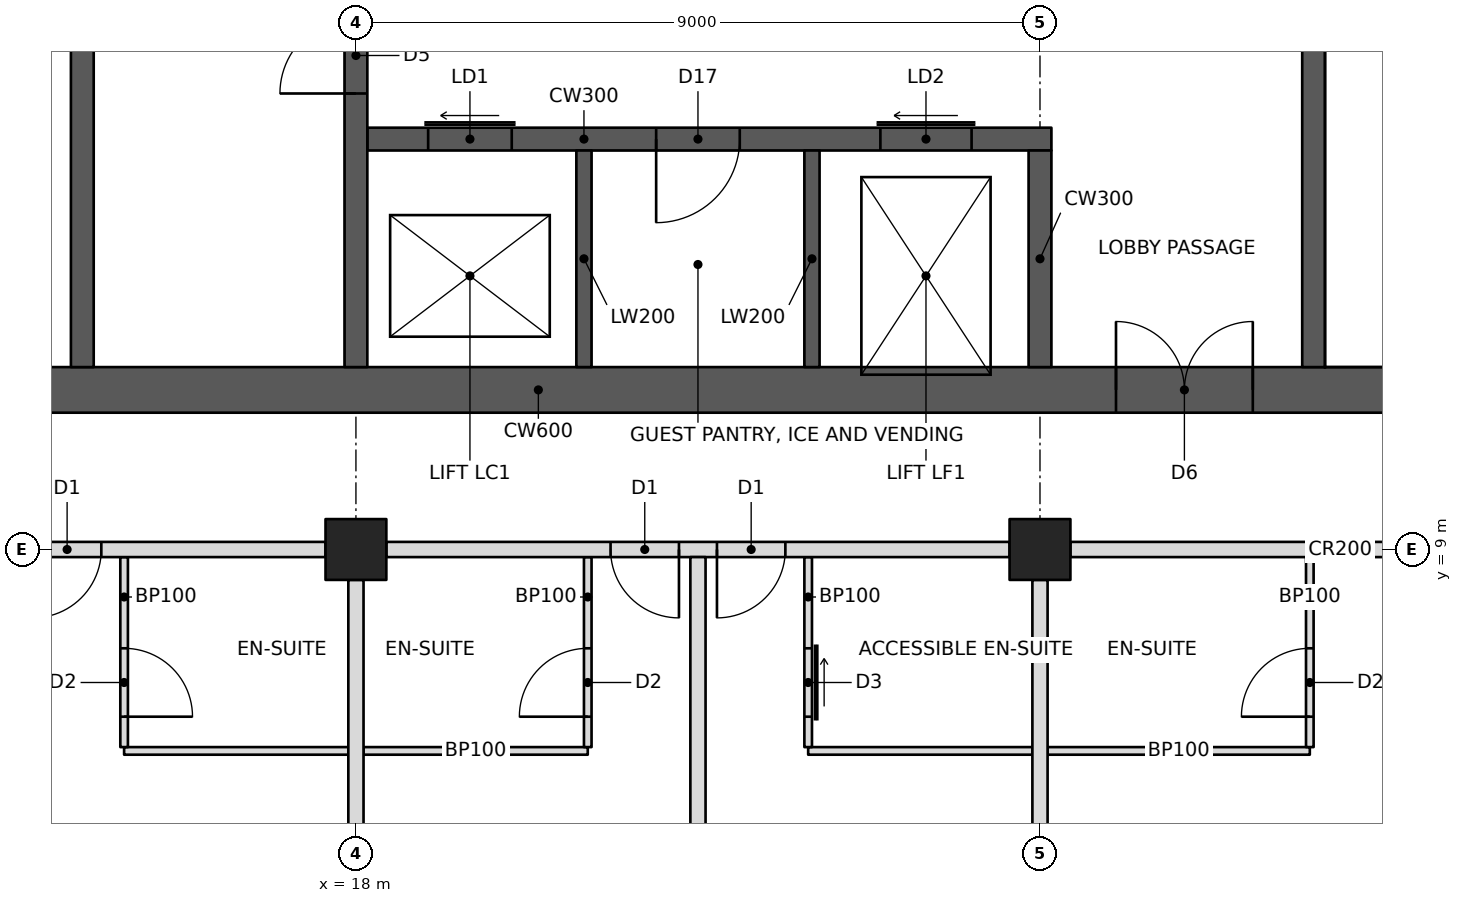
"""IFC4 building model, lengths in metres.
Left out: names, types, materials, properties, quantities, classifications, styles, units other than length and angle.
Written with IfcOpenShell. Run it as: python <this file> out.ifc"""

import sys

from ifc_helpers import new_model, si_unit, direction, frame, frame_2d, origin, origin_2d, place, context, subcontext, project, spatial, rectangle, hollow_rectangle, extrude, element, fill, save


model = new_model("IFC4")
c1 = context("Model", 3, precision=1e-05, world=origin(), true_north=direction((0.0, 1.0)))
c2 = subcontext(c1, "Body", "Model", "MODEL_VIEW")
j1 = project(units=[si_unit("LENGTHUNIT", "METRE"), si_unit("PLANEANGLEUNIT", "RADIAN")], contexts=[c1])
p1 = place(None, origin())
s1 = spatial("IfcSite", under=j1, at=p1, CompositionType="ELEMENT")
p2 = place(p1, origin())
s2 = spatial("IfcBuilding", under=s1, at=p2, CompositionType="ELEMENT")
p3 = place(p2, frame((0.0, 0.0, 255.4)))
s3 = spatial("IfcBuildingStorey", under=s2, at=p3, CompositionType="ELEMENT", Elevation=255.4)
for number, where, z_axis, x_axis in (
    (1, (18.0, 9.0, 0.0), (0.0, 0.0, 1.0), (1.0, 0.0, 0.0)),
    (2, (27.0, 9.0, 0.0), (0.0, 0.0, 1.0), (1.0, 0.0, 0.0)),
):
    element("IfcColumn", number, at=place(p3, frame(where, z_axis=z_axis, x_axis=x_axis)), inside=s3, PredefinedType="COLUMN", context=c2, shape_type="SweptSolid", body=[
        extrude(hollow_rectangle(XDim=0.8, YDim=0.8, WallThickness=0.032, at=origin_2d()), origin(), (0.0, 0.0, 1.0), 3.6),
    ])
p4 = place(p3, frame((10.8, 11.1, 0.0), z_axis=(0.0, 0.0, 1.0), x_axis=(1.0, 0.0, 0.0)))
e3 = element("IfcWall", 3, at=p4, inside=s3, PredefinedType="SHEAR", context=c2, shape_type="SweptSolid", body=[
    extrude(rectangle(XDim=23.4, YDim=0.6, at=frame_2d((11.7, 0.0))), origin(), (0.0, 0.0, 1.0), 3.6),
])
p5 = place(p4, frame((1.0, 0.0, 0.0)))
e4 = element("IfcOpeningElement", 4, at=p5, cuts=e3, PredefinedType="OPENING", context=c2, shape_type="SweptSolid", body=[
    extrude(rectangle(XDim=1.0, YDim=2.1, at=frame_2d((0.5, 1.05))), frame((0.0, 0.31, 0.0), z_axis=(0.0, -1.0, 0.0), x_axis=(1.0, 0.0, 0.0)), (0.0, 0.0, 1.0), 0.62),
])
p6 = place(p4, frame((17.2, 0.0, 0.0)))
e5 = element("IfcOpeningElement", 5, at=p6, cuts=e3, PredefinedType="OPENING", context=c2, shape_type="SweptSolid", body=[
    extrude(rectangle(XDim=1.8, YDim=2.1, at=frame_2d((0.9, 1.05))), frame((0.0, 0.31, 0.0), z_axis=(0.0, -1.0, 0.0), x_axis=(1.0, 0.0, 0.0)), (0.0, 0.0, 1.0), 0.62),
])
p7 = place(p3, frame((14.4, 11.4, 0.0), z_axis=(0.0, 0.0, 1.0), x_axis=(0.0, 1.0, 0.0)))
e6 = element("IfcWall", 6, at=p7, inside=s3, PredefinedType="SHEAR", context=c2, shape_type="SweptSolid", body=[
    extrude(rectangle(XDim=13.2, YDim=0.3, at=frame_2d((6.6, 0.0))), origin(), (0.0, 0.0, 1.0), 3.6),
])
p8 = place(p3, frame((18.0, 11.4, 0.0), z_axis=(0.0, 0.0, 1.0), x_axis=(0.0, 1.0, 0.0)))
e7 = element("IfcWall", 7, at=p8, inside=s3, PredefinedType="SHEAR", context=c2, shape_type="SweptSolid", body=[
    extrude(rectangle(XDim=13.2, YDim=0.3, at=frame_2d((6.6, 0.0))), origin(), (0.0, 0.0, 1.0), 3.6),
])
p9 = place(p8, frame((3.6, 0.0, 0.0)))
e8 = element("IfcOpeningElement", 8, at=p9, cuts=e7, PredefinedType="OPENING", context=c2, shape_type="SweptSolid", body=[
    extrude(rectangle(XDim=1.0, YDim=2.1, at=frame_2d((0.5, 1.05))), frame((0.0, 0.16, 0.0), z_axis=(0.0, -1.0, 0.0), x_axis=(1.0, 0.0, 0.0)), (0.0, 0.0, 1.0), 0.32),
])
p10 = place(p8, frame((7.85, 0.0, 0.0)))
e9 = element("IfcOpeningElement", 9, at=p10, cuts=e7, PredefinedType="OPENING", context=c2, shape_type="SweptSolid", body=[
    extrude(rectangle(XDim=1.1, YDim=2.1, at=frame_2d((0.55, 1.05))), frame((0.0, 0.16, 0.0), z_axis=(0.0, -1.0, 0.0), x_axis=(1.0, 0.0, 0.0)), (0.0, 0.0, 1.0), 0.32),
])
p11 = place(p3, frame((18.15, 14.4, 0.0), z_axis=(0.0, 0.0, 1.0), x_axis=(1.0, 0.0, 0.0)))
e10 = element("IfcWall", 10, at=p11, inside=s3, PredefinedType="SHEAR", context=c2, shape_type="SweptSolid", body=[
    extrude(rectangle(XDim=9.0, YDim=0.3, at=frame_2d((4.5, 0.0))), origin(), (0.0, 0.0, 1.0), 3.6),
])
p12 = place(p11, frame((0.8, 0.0, 0.0)))
e11 = element("IfcOpeningElement", 11, at=p12, cuts=e10, PredefinedType="OPENING", context=c2, shape_type="SweptSolid", body=[
    extrude(rectangle(XDim=1.1, YDim=2.1, at=frame_2d((0.55, 1.05))), frame((0.0, 0.16, 0.0), z_axis=(0.0, -1.0, 0.0), x_axis=(1.0, 0.0, 0.0)), (0.0, 0.0, 1.0), 0.32),
])
p13 = place(p11, frame((6.75, 0.0, 0.0)))
e12 = element("IfcOpeningElement", 12, at=p13, cuts=e10, PredefinedType="OPENING", context=c2, shape_type="SweptSolid", body=[
    extrude(rectangle(XDim=1.2, YDim=2.1, at=frame_2d((0.6, 1.05))), frame((0.0, 0.16, 0.0), z_axis=(0.0, -1.0, 0.0), x_axis=(1.0, 0.0, 0.0)), (0.0, 0.0, 1.0), 0.32),
])
p14 = place(p11, frame((3.8, 0.0, 0.0)))
e13 = element("IfcOpeningElement", 13, at=p14, cuts=e10, PredefinedType="OPENING", context=c2, shape_type="SweptSolid", body=[
    extrude(rectangle(XDim=1.1, YDim=2.1, at=frame_2d((0.55, 1.05))), frame((0.0, 0.16, 0.0), z_axis=(0.0, -1.0, 0.0), x_axis=(1.0, 0.0, 0.0)), (0.0, 0.0, 1.0), 0.32),
])
p15 = place(p3, frame((27.0, 11.4, 0.0), z_axis=(0.0, 0.0, 1.0), x_axis=(0.0, 1.0, 0.0)))
e14 = element("IfcWall", 14, at=p15, inside=s3, PredefinedType="SHEAR", context=c2, shape_type="SweptSolid", body=[
    extrude(rectangle(XDim=2.85, YDim=0.3, at=frame_2d((1.425, 0.0))), origin(), (0.0, 0.0, 1.0), 3.6),
])
for number, where, z_axis, x_axis in (
    (15, (21.0, 11.4, 0.0), (0.0, 0.0, 1.0), (0.0, 1.0, 0.0)),
    (16, (24.0, 11.4, 0.0), (0.0, 0.0, 1.0), (0.0, 1.0, 0.0)),
):
    element("IfcWall", number, at=place(p3, frame(where, z_axis=z_axis, x_axis=x_axis)), inside=s3, PredefinedType="SHEAR", context=c2, shape_type="SweptSolid", body=[
        extrude(rectangle(XDim=2.85, YDim=0.2, at=frame_2d((1.425, 0.0))), origin(), (0.0, 0.0, 1.0), 3.6),
    ])
p16 = place(p3, frame((30.6, 11.4, 0.0), z_axis=(0.0, 0.0, 1.0), x_axis=(0.0, 1.0, 0.0)))
e17 = element("IfcWall", 17, at=p16, inside=s3, PredefinedType="SHEAR", context=c2, shape_type="SweptSolid", body=[
    extrude(rectangle(XDim=13.2, YDim=0.3, at=frame_2d((6.6, 0.0))), origin(), (0.0, 0.0, 1.0), 3.6),
])
p17 = place(p3, frame((9.4, 9.0, 0.0), z_axis=(0.0, 0.0, 1.0), x_axis=(1.0, 0.0, 0.0)))
e18 = element("IfcWall", 18, at=p17, inside=s3, PredefinedType="PARTITIONING", context=c2, shape_type="SweptSolid", body=[
    extrude(rectangle(XDim=8.2, YDim=0.2, at=frame_2d((4.1, 0.0))), origin(), (0.0, 0.0, 1.0), 2.605),
])
p18 = place(p17, frame((2.95, 0.0, 0.0)))
e19 = element("IfcOpeningElement", 19, at=p18, cuts=e18, PredefinedType="OPENING", context=c2, shape_type="SweptSolid", body=[
    extrude(rectangle(XDim=0.9, YDim=2.1, at=frame_2d((0.45, 1.05))), frame((0.0, 0.11, 0.0), z_axis=(0.0, -1.0, 0.0), x_axis=(1.0, 0.0, 0.0)), (0.0, 0.0, 1.0), 0.22),
])
p19 = place(p17, frame((4.35, 0.0, 0.0)))
e20 = element("IfcOpeningElement", 20, at=p19, cuts=e18, PredefinedType="OPENING", context=c2, shape_type="SweptSolid", body=[
    extrude(rectangle(XDim=0.9, YDim=2.1, at=frame_2d((0.45, 1.05))), frame((0.0, 0.11, 0.0), z_axis=(0.0, -1.0, 0.0), x_axis=(1.0, 0.0, 0.0)), (0.0, 0.0, 1.0), 0.22),
])
p20 = place(p3, frame((18.4, 9.0, 0.0), z_axis=(0.0, 0.0, 1.0), x_axis=(1.0, 0.0, 0.0)))
e21 = element("IfcWall", 21, at=p20, inside=s3, PredefinedType="PARTITIONING", context=c2, shape_type="SweptSolid", body=[
    extrude(rectangle(XDim=8.2, YDim=0.2, at=frame_2d((4.1, 0.0))), origin(), (0.0, 0.0, 1.0), 2.605),
])
p21 = place(p20, frame((2.95, 0.0, 0.0)))
e22 = element("IfcOpeningElement", 22, at=p21, cuts=e21, PredefinedType="OPENING", context=c2, shape_type="SweptSolid", body=[
    extrude(rectangle(XDim=0.9, YDim=2.1, at=frame_2d((0.45, 1.05))), frame((0.0, 0.11, 0.0), z_axis=(0.0, -1.0, 0.0), x_axis=(1.0, 0.0, 0.0)), (0.0, 0.0, 1.0), 0.22),
])
p22 = place(p20, frame((4.35, 0.0, 0.0)))
e23 = element("IfcOpeningElement", 23, at=p22, cuts=e21, PredefinedType="OPENING", context=c2, shape_type="SweptSolid", body=[
    extrude(rectangle(XDim=0.9, YDim=2.1, at=frame_2d((0.45, 1.05))), frame((0.0, 0.11, 0.0), z_axis=(0.0, -1.0, 0.0), x_axis=(1.0, 0.0, 0.0)), (0.0, 0.0, 1.0), 0.22),
])
p23 = place(p3, frame((27.4, 9.0, 0.0), z_axis=(0.0, 0.0, 1.0), x_axis=(1.0, 0.0, 0.0)))
e24 = element("IfcWall", 24, at=p23, inside=s3, PredefinedType="PARTITIONING", context=c2, shape_type="SweptSolid", body=[
    extrude(rectangle(XDim=8.378, YDim=0.2, at=frame_2d((4.189, 0.0))), origin(), (0.0, 0.0, 1.0), 2.605),
])
p24 = place(p23, frame((7.25, 0.0, 0.0)))
e25 = element("IfcOpeningElement", 25, at=p24, cuts=e24, PredefinedType="OPENING", context=c2, shape_type="SweptSolid", body=[
    extrude(rectangle(XDim=0.9, YDim=2.1, at=frame_2d((0.45, 1.05))), frame((0.0, 0.11, 0.0), z_axis=(0.0, -1.0, 0.0), x_axis=(1.0, 0.0, 0.0)), (0.0, 0.0, 1.0), 0.22),
])
p25 = place(p3, frame((18.0, 8.6, 0.0), z_axis=(0.0, 0.0, 1.0), x_axis=(0.0, -1.0, 0.0)))
e26 = element("IfcWall", 26, at=p25, inside=s3, PredefinedType="PARTITIONING", context=c2, shape_type="SweptSolid", body=[
    extrude(rectangle(XDim=7.6, YDim=0.2, at=frame_2d((3.8, 0.0))), origin(), (0.0, 0.0, 1.0), 2.605),
])
p26 = place(p3, frame((22.5, 8.9, 0.0), z_axis=(0.0, 0.0, 1.0), x_axis=(0.0, -1.0, 0.0)))
e27 = element("IfcWall", 27, at=p26, inside=s3, PredefinedType="PARTITIONING", context=c2, shape_type="SweptSolid", body=[
    extrude(rectangle(XDim=7.9, YDim=0.2, at=frame_2d((3.95, 0.0))), origin(), (0.0, 0.0, 1.0), 2.604),
])
p27 = place(p3, frame((27.0, 8.6, 0.0), z_axis=(0.0, 0.0, 1.0), x_axis=(0.0, -1.0, 0.0)))
e28 = element("IfcWall", 28, at=p27, inside=s3, PredefinedType="PARTITIONING", context=c2, shape_type="SweptSolid", body=[
    extrude(rectangle(XDim=7.6, YDim=0.2, at=frame_2d((3.8, 0.0))), origin(), (0.0, 0.0, 1.0), 2.605),
])
p28 = place(p3, frame((14.95, 6.35, 0.0), z_axis=(0.0, 0.0, 1.0), x_axis=(1.0, 0.0, 0.0)))
e29 = element("IfcWall", 29, at=p28, inside=s3, PredefinedType="PARTITIONING", context=c2, shape_type="SweptSolid", body=[
    extrude(rectangle(XDim=2.95, YDim=0.1, at=frame_2d((1.475, 0.0))), origin(), (0.0, 0.0, 1.0), 2.604),
])
p29 = place(p3, frame((14.95, 8.9, 0.0), z_axis=(0.0, 0.0, 1.0), x_axis=(0.0, -1.0, 0.0)))
e30 = element("IfcWall", 30, at=p29, inside=s3, PredefinedType="PARTITIONING", context=c2, shape_type="SweptSolid", body=[
    extrude(rectangle(XDim=2.5, YDim=0.1, at=frame_2d((1.25, 0.0))), origin(), (0.0, 0.0, 1.0), 2.604),
])
p30 = place(p29, frame((1.2, 0.0, 0.0)))
e31 = element("IfcOpeningElement", 31, at=p30, cuts=e30, PredefinedType="OPENING", context=c2, shape_type="SweptSolid", body=[
    extrude(rectangle(XDim=0.9, YDim=2.1, at=frame_2d((0.45, 1.05))), frame((0.0, 0.06, 0.0), z_axis=(0.0, -1.0, 0.0), x_axis=(1.0, 0.0, 0.0)), (0.0, 0.0, 1.0), 0.12),
])
p31 = place(p3, frame((18.1, 6.35, 0.0), z_axis=(0.0, 0.0, 1.0), x_axis=(1.0, 0.0, 0.0)))
e32 = element("IfcWall", 32, at=p31, inside=s3, PredefinedType="PARTITIONING", context=c2, shape_type="SweptSolid", body=[
    extrude(rectangle(XDim=2.95, YDim=0.1, at=frame_2d((1.475, 0.0))), origin(), (0.0, 0.0, 1.0), 2.604),
])
p32 = place(p3, frame((21.05, 8.9, 0.0), z_axis=(0.0, 0.0, 1.0), x_axis=(0.0, -1.0, 0.0)))
e33 = element("IfcWall", 33, at=p32, inside=s3, PredefinedType="PARTITIONING", context=c2, shape_type="SweptSolid", body=[
    extrude(rectangle(XDim=2.5, YDim=0.1, at=frame_2d((1.25, 0.0))), origin(), (0.0, 0.0, 1.0), 2.604),
])
p33 = place(p32, frame((1.2, 0.0, 0.0)))
e34 = element("IfcOpeningElement", 34, at=p33, cuts=e33, PredefinedType="OPENING", context=c2, shape_type="SweptSolid", body=[
    extrude(rectangle(XDim=0.9, YDim=2.1, at=frame_2d((0.45, 1.05))), frame((0.0, 0.06, 0.0), z_axis=(0.0, -1.0, 0.0), x_axis=(1.0, 0.0, 0.0)), (0.0, 0.0, 1.0), 0.12),
])
p34 = place(p3, frame((23.95, 6.35, 0.0), z_axis=(0.0, 0.0, 1.0), x_axis=(1.0, 0.0, 0.0)))
e35 = element("IfcWall", 35, at=p34, inside=s3, PredefinedType="PARTITIONING", context=c2, shape_type="SweptSolid", body=[
    extrude(rectangle(XDim=2.95, YDim=0.1, at=frame_2d((1.475, 0.0))), origin(), (0.0, 0.0, 1.0), 2.604),
])
p35 = place(p3, frame((23.95, 8.9, 0.0), z_axis=(0.0, 0.0, 1.0), x_axis=(0.0, -1.0, 0.0)))
e36 = element("IfcWall", 36, at=p35, inside=s3, PredefinedType="PARTITIONING", context=c2, shape_type="SweptSolid", body=[
    extrude(rectangle(XDim=2.5, YDim=0.1, at=frame_2d((1.25, 0.0))), origin(), (0.0, 0.0, 1.0), 2.604),
])
p36 = place(p35, frame((1.2, 0.0, 0.0)))
e37 = element("IfcOpeningElement", 37, at=p36, cuts=e36, PredefinedType="OPENING", context=c2, shape_type="SweptSolid", body=[
    extrude(rectangle(XDim=0.9, YDim=2.1, at=frame_2d((0.45, 1.05))), frame((0.0, 0.06, 0.0), z_axis=(0.0, -1.0, 0.0), x_axis=(1.0, 0.0, 0.0)), (0.0, 0.0, 1.0), 0.12),
])
p37 = place(p3, frame((27.1, 6.35, 0.0), z_axis=(0.0, 0.0, 1.0), x_axis=(1.0, 0.0, 0.0)))
e38 = element("IfcWall", 38, at=p37, inside=s3, PredefinedType="PARTITIONING", context=c2, shape_type="SweptSolid", body=[
    extrude(rectangle(XDim=3.45, YDim=0.1, at=frame_2d((1.725, 0.0))), origin(), (0.0, 0.0, 1.0), 2.604),
])
p38 = place(p3, frame((30.55, 8.9, 0.0), z_axis=(0.0, 0.0, 1.0), x_axis=(0.0, -1.0, 0.0)))
e39 = element("IfcWall", 39, at=p38, inside=s3, PredefinedType="PARTITIONING", context=c2, shape_type="SweptSolid", body=[
    extrude(rectangle(XDim=2.5, YDim=0.1, at=frame_2d((1.25, 0.0))), origin(), (0.0, 0.0, 1.0), 2.604),
])
p39 = place(p38, frame((1.2, 0.0, 0.0)))
e40 = element("IfcOpeningElement", 40, at=p39, cuts=e39, PredefinedType="OPENING", context=c2, shape_type="SweptSolid", body=[
    extrude(rectangle(XDim=0.9, YDim=2.1, at=frame_2d((0.45, 1.05))), frame((0.0, 0.06, 0.0), z_axis=(0.0, -1.0, 0.0), x_axis=(1.0, 0.0, 0.0)), (0.0, 0.0, 1.0), 0.12),
])
p40 = place(p30, origin())
e41 = element("IfcDoor", 41, at=p40, inside=s3, OperationType="SINGLE_SWING_RIGHT", PredefinedType="DOOR", context=c2, shape_type="SweptSolid", body=[
    extrude(rectangle(XDim=0.9, YDim=2.1, at=frame_2d((0.45, 1.05))), frame((0.0, 0.025, 0.0), z_axis=(0.0, -1.0, 0.0), x_axis=(1.0, 0.0, 0.0)), (0.0, 0.0, 1.0), 0.05),
])
fill(e31, e41)
p41 = place(p19, frame((0.9, 0.0, 0.0), z_axis=(0.0, 0.0, 1.0), x_axis=(-1.0, 0.0, 0.0)))
e42 = element("IfcDoor", 42, at=p41, inside=s3, OperationType="SINGLE_SWING_RIGHT", PredefinedType="DOOR", context=c2, shape_type="SweptSolid", body=[
    extrude(rectangle(XDim=0.9, YDim=2.1, at=frame_2d((0.45, 1.05))), frame((0.0, 0.025, 0.0), z_axis=(0.0, -1.0, 0.0), x_axis=(1.0, 0.0, 0.0)), (0.0, 0.0, 1.0), 0.05),
])
fill(e20, e42)
p42 = place(p33, frame((0.9, 0.0, 0.0), z_axis=(0.0, 0.0, 1.0), x_axis=(-1.0, 0.0, 0.0)))
e43 = element("IfcDoor", 43, at=p42, inside=s3, OperationType="SINGLE_SWING_LEFT", PredefinedType="DOOR", context=c2, shape_type="SweptSolid", body=[
    extrude(rectangle(XDim=0.9, YDim=2.1, at=frame_2d((0.45, 1.05))), frame((0.0, 0.025, 0.0), z_axis=(0.0, -1.0, 0.0), x_axis=(1.0, 0.0, 0.0)), (0.0, 0.0, 1.0), 0.05),
])
fill(e34, e43)
p43 = place(p21, frame((0.9, 0.0, 0.0), z_axis=(0.0, 0.0, 1.0), x_axis=(-1.0, 0.0, 0.0)))
e44 = element("IfcDoor", 44, at=p43, inside=s3, OperationType="SINGLE_SWING_LEFT", PredefinedType="DOOR", context=c2, shape_type="SweptSolid", body=[
    extrude(rectangle(XDim=0.9, YDim=2.1, at=frame_2d((0.45, 1.05))), frame((0.0, 0.025, 0.0), z_axis=(0.0, -1.0, 0.0), x_axis=(1.0, 0.0, 0.0)), (0.0, 0.0, 1.0), 0.05),
])
fill(e22, e44)
p44 = place(p36, origin())
e45 = element("IfcDoor", 45, at=p44, inside=s3, OperationType="SLIDING_TO_LEFT", PredefinedType="DOOR", context=c2, shape_type="SweptSolid", body=[
    extrude(rectangle(XDim=0.9, YDim=2.1, at=frame_2d((0.45, 1.05))), frame((0.0, 0.025, 0.0), z_axis=(0.0, -1.0, 0.0), x_axis=(1.0, 0.0, 0.0)), (0.0, 0.0, 1.0), 0.05),
])
fill(e37, e45)
p45 = place(p22, frame((0.9, 0.0, 0.0), z_axis=(0.0, 0.0, 1.0), x_axis=(-1.0, 0.0, 0.0)))
e46 = element("IfcDoor", 46, at=p45, inside=s3, OperationType="SINGLE_SWING_RIGHT", PredefinedType="DOOR", context=c2, shape_type="SweptSolid", body=[
    extrude(rectangle(XDim=0.9, YDim=2.1, at=frame_2d((0.45, 1.05))), frame((0.0, 0.025, 0.0), z_axis=(0.0, -1.0, 0.0), x_axis=(1.0, 0.0, 0.0)), (0.0, 0.0, 1.0), 0.05),
])
fill(e23, e46)
p46 = place(p39, frame((0.9, 0.0, 0.0), z_axis=(0.0, 0.0, 1.0), x_axis=(-1.0, 0.0, 0.0)))
e47 = element("IfcDoor", 47, at=p46, inside=s3, OperationType="SINGLE_SWING_LEFT", PredefinedType="DOOR", context=c2, shape_type="SweptSolid", body=[
    extrude(rectangle(XDim=0.9, YDim=2.1, at=frame_2d((0.45, 1.05))), frame((0.0, 0.025, 0.0), z_axis=(0.0, -1.0, 0.0), x_axis=(1.0, 0.0, 0.0)), (0.0, 0.0, 1.0), 0.05),
])
fill(e40, e47)
p47 = place(p6, origin())
e48 = element("IfcDoor", 48, at=p47, inside=s3, OperationType="DOUBLE_DOOR_SINGLE_SWING", PredefinedType="DOOR", context=c2, shape_type="SweptSolid", body=[
    extrude(rectangle(XDim=1.8, YDim=2.1, at=frame_2d((0.9, 1.05))), frame((0.0, 0.025, 0.0), z_axis=(0.0, -1.0, 0.0), x_axis=(1.0, 0.0, 0.0)), (0.0, 0.0, 1.0), 0.05),
])
fill(e5, e48)
p48 = place(p9, origin())
e49 = element("IfcDoor", 49, at=p48, inside=s3, OperationType="SINGLE_SWING_LEFT", PredefinedType="DOOR", context=c2, shape_type="SweptSolid", body=[
    extrude(rectangle(XDim=1.0, YDim=2.1, at=frame_2d((0.5, 1.05))), frame((0.0, 0.025, 0.0), z_axis=(0.0, -1.0, 0.0), x_axis=(1.0, 0.0, 0.0)), (0.0, 0.0, 1.0), 0.05),
])
fill(e8, e49)
p49 = place(p12, origin())
e50 = element("IfcDoor", 50, at=p49, inside=s3, OperationType="SLIDING_TO_LEFT", PredefinedType="DOOR", context=c2, shape_type="SweptSolid", body=[
    extrude(rectangle(XDim=1.1, YDim=2.1, at=frame_2d((0.55, 1.05))), frame((0.0, 0.025, 0.0), z_axis=(0.0, -1.0, 0.0), x_axis=(1.0, 0.0, 0.0)), (0.0, 0.0, 1.0), 0.05),
])
fill(e11, e50)
p50 = place(p13, origin())
e51 = element("IfcDoor", 51, at=p50, inside=s3, OperationType="SLIDING_TO_LEFT", PredefinedType="DOOR", context=c2, shape_type="SweptSolid", body=[
    extrude(rectangle(XDim=1.2, YDim=2.1, at=frame_2d((0.6, 1.05))), frame((0.0, 0.025, 0.0), z_axis=(0.0, -1.0, 0.0), x_axis=(1.0, 0.0, 0.0)), (0.0, 0.0, 1.0), 0.05),
])
fill(e12, e51)
p51 = place(p14, frame((1.1, 0.0, 0.0), z_axis=(0.0, 0.0, 1.0), x_axis=(-1.0, 0.0, 0.0)))
e52 = element("IfcDoor", 52, at=p51, inside=s3, OperationType="SINGLE_SWING_RIGHT", PredefinedType="DOOR", context=c2, shape_type="SweptSolid", body=[
    extrude(rectangle(XDim=1.1, YDim=2.1, at=frame_2d((0.55, 1.05))), frame((0.0, 0.025, 0.0), z_axis=(0.0, -1.0, 0.0), x_axis=(1.0, 0.0, 0.0)), (0.0, 0.0, 1.0), 0.05),
])
fill(e13, e52)
save(model, sys.argv[1])
